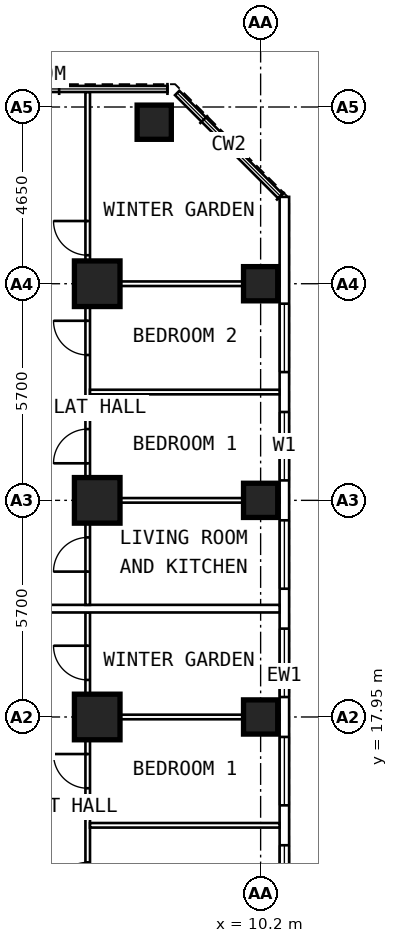
"""IFC4 building model, lengths in metres.
Left out: names, types, materials, properties, quantities, classifications, styles, units other than length and angle.
Written with IfcOpenShell. Run it as: python <this file> out.ifc"""

import sys

from ifc_helpers import new_model, si_unit, direction, frame, frame_2d, origin, origin_2d, place, context, subcontext, project, spatial, rectangle, extrude, element, fill, save


model = new_model("IFC4")
c1 = context("Model", 3, precision=1e-05, world=origin(), true_north=direction((0.0, 1.0)))
c2 = subcontext(c1, "Body", "Model", "MODEL_VIEW")
j1 = project(units=[si_unit("LENGTHUNIT", "METRE"), si_unit("PLANEANGLEUNIT", "RADIAN")], contexts=[c1])
p1 = place(None, origin())
s1 = spatial("IfcSite", under=j1, at=p1, CompositionType="ELEMENT")
p2 = place(p1, origin())
s2 = spatial("IfcBuilding", under=s1, at=p2, CompositionType="ELEMENT")
p3 = place(p2, frame((0.0, 0.0, 88.0)))
s3 = spatial("IfcBuildingStorey", under=s2, at=p3, CompositionType="ELEMENT", Elevation=88.0)
for number, where, z_axis, x_axis in (
    (1, (10.2, 17.95, 0.0), (0.0, 0.0, 1.0), (0.0, 1.0, 0.0)),
    (2, (10.2, 23.65, 0.0), (0.0, 0.0, 1.0), (0.0, 1.0, 0.0)),
    (3, (10.2, 29.35, 0.0), (0.0, 0.0, 1.0), (0.0, 1.0, 0.0)),
    (4, (7.4, 33.6, 0.0), (0.0, 0.0, 1.0), (0.0, 1.0, 0.0)),
):
    element("IfcColumn", number, at=place(p3, frame(where, z_axis=z_axis, x_axis=x_axis)), inside=s3, PredefinedType="COLUMN", context=c2, shape_type="SweptSolid", body=[
        extrude(rectangle(XDim=0.9, YDim=0.9, at=origin_2d()), origin(), (0.0, 0.0, 1.0), 3.6),
    ])
for number, where, z_axis, x_axis in (
    (5, (5.9, 17.95, 0.0), (0.0, 0.0, 1.0), (0.0, 1.0, 0.0)),
    (6, (5.9, 23.65, 0.0), (0.0, 0.0, 1.0), (0.0, 1.0, 0.0)),
    (7, (5.9, 29.35, 0.0), (0.0, 0.0, 1.0), (0.0, 1.0, 0.0)),
):
    element("IfcColumn", number, at=place(p3, frame(where, z_axis=z_axis, x_axis=x_axis)), inside=s3, PredefinedType="COLUMN", context=c2, shape_type="SweptSolid", body=[
        extrude(rectangle(XDim=1.2, YDim=1.2, at=origin_2d()), origin(), (0.0, 0.0, 1.0), 3.6),
    ])
p4 = place(p3, frame((10.825, 6.409, 0.0), z_axis=(0.0, 0.0, 1.0), x_axis=(0.0, 1.0, 0.0)))
e8 = element("IfcWall", 8, at=p4, inside=s3, PredefinedType="SOLIDWALL", context=c2, shape_type="SweptSolid", body=[
    extrude(rectangle(XDim=25.226, YDim=0.25, at=frame_2d((12.613, 0.0))), origin(), (0.0, 0.0, 1.0), 3.35),
])
p5 = place(p4, frame((0.666, 0.0, 0.8)))
e9 = element("IfcOpeningElement", 9, at=p5, cuts=e8, PredefinedType="OPENING", context=c2, shape_type="SweptSolid", body=[
    extrude(rectangle(XDim=1.8, YDim=1.8, at=frame_2d((0.9, 0.9))), frame((0.0, 0.137, 0.0), z_axis=(0.0, -1.0, 0.0), x_axis=(1.0, 0.0, 0.0)), (0.0, 0.0, 1.0), 0.274),
])
p6 = place(p4, frame((3.516, 0.0, 0.8)))
e10 = element("IfcOpeningElement", 10, at=p6, cuts=e8, PredefinedType="OPENING", context=c2, shape_type="SweptSolid", body=[
    extrude(rectangle(XDim=1.8, YDim=1.8, at=frame_2d((0.9, 0.9))), frame((0.0, 0.137, 0.0), z_axis=(0.0, -1.0, 0.0), x_axis=(1.0, 0.0, 0.0)), (0.0, 0.0, 1.0), 0.274),
])
p7 = place(p4, frame((6.366, 0.0, 0.8)))
e11 = element("IfcOpeningElement", 11, at=p7, cuts=e8, PredefinedType="OPENING", context=c2, shape_type="SweptSolid", body=[
    extrude(rectangle(XDim=1.8, YDim=1.8, at=frame_2d((0.9, 0.9))), frame((0.0, 0.137, 0.0), z_axis=(0.0, -1.0, 0.0), x_axis=(1.0, 0.0, 0.0)), (0.0, 0.0, 1.0), 0.274),
])
p8 = place(p4, frame((9.216, 0.0, 0.8)))
e12 = element("IfcOpeningElement", 12, at=p8, cuts=e8, PredefinedType="OPENING", context=c2, shape_type="SweptSolid", body=[
    extrude(rectangle(XDim=1.8, YDim=1.8, at=frame_2d((0.9, 0.9))), frame((0.0, 0.137, 0.0), z_axis=(0.0, -1.0, 0.0), x_axis=(1.0, 0.0, 0.0)), (0.0, 0.0, 1.0), 0.274),
])
p9 = place(p4, frame((12.066, 0.0, 0.8)))
e13 = element("IfcOpeningElement", 13, at=p9, cuts=e8, PredefinedType="OPENING", context=c2, shape_type="SweptSolid", body=[
    extrude(rectangle(XDim=1.8, YDim=1.8, at=frame_2d((0.9, 0.9))), frame((0.0, 0.137, 0.0), z_axis=(0.0, -1.0, 0.0), x_axis=(1.0, 0.0, 0.0)), (0.0, 0.0, 1.0), 0.274),
])
p10 = place(p4, frame((14.916, 0.0, 0.8)))
e14 = element("IfcOpeningElement", 14, at=p10, cuts=e8, PredefinedType="OPENING", context=c2, shape_type="SweptSolid", body=[
    extrude(rectangle(XDim=1.8, YDim=1.8, at=frame_2d((0.9, 0.9))), frame((0.0, 0.137, 0.0), z_axis=(0.0, -1.0, 0.0), x_axis=(1.0, 0.0, 0.0)), (0.0, 0.0, 1.0), 0.274),
])
p11 = place(p4, frame((17.766, 0.0, 0.8)))
e15 = element("IfcOpeningElement", 15, at=p11, cuts=e8, PredefinedType="OPENING", context=c2, shape_type="SweptSolid", body=[
    extrude(rectangle(XDim=1.8, YDim=1.8, at=frame_2d((0.9, 0.9))), frame((0.0, 0.137, 0.0), z_axis=(0.0, -1.0, 0.0), x_axis=(1.0, 0.0, 0.0)), (0.0, 0.0, 1.0), 0.274),
])
p12 = place(p4, frame((20.616, 0.0, 0.8)))
e16 = element("IfcOpeningElement", 16, at=p12, cuts=e8, PredefinedType="OPENING", context=c2, shape_type="SweptSolid", body=[
    extrude(rectangle(XDim=1.8, YDim=1.8, at=frame_2d((0.9, 0.9))), frame((0.0, 0.137, 0.0), z_axis=(0.0, -1.0, 0.0), x_axis=(1.0, 0.0, 0.0)), (0.0, 0.0, 1.0), 0.274),
])
p13 = place(p3, frame((5.65, 9.6, 0.0), z_axis=(0.0, 0.0, 1.0), x_axis=(0.0, 1.0, 0.0)))
e17 = element("IfcWall", 17, at=p13, inside=s3, PredefinedType="PARTITIONING", context=c2, shape_type="SweptSolid", body=[
    extrude(rectangle(XDim=11.1, YDim=0.12, at=frame_2d((5.55, 0.0))), origin(), (0.0, 0.0, 1.0), 3.35),
])
p14 = place(p13, frame((1.0, 0.0, 0.0)))
e18 = element("IfcOpeningElement", 18, at=p14, cuts=e17, PredefinedType="OPENING", context=c2, shape_type="SweptSolid", body=[
    extrude(rectangle(XDim=0.9, YDim=2.1, at=frame_2d((0.45, 1.05))), frame((0.0, 0.072, 0.0), z_axis=(0.0, -1.0, 0.0), x_axis=(1.0, 0.0, 0.0)), (0.0, 0.0, 1.0), 0.144),
])
p15 = place(p13, frame((3.625, 0.0, 0.0)))
e19 = element("IfcOpeningElement", 19, at=p15, cuts=e17, PredefinedType="OPENING", context=c2, shape_type="SweptSolid", body=[
    extrude(rectangle(XDim=0.9, YDim=2.1, at=frame_2d((0.45, 1.05))), frame((0.0, 0.072, 0.0), z_axis=(0.0, -1.0, 0.0), x_axis=(1.0, 0.0, 0.0)), (0.0, 0.0, 1.0), 0.144),
])
p16 = place(p13, frame((6.475, 0.0, 0.0)))
e20 = element("IfcOpeningElement", 20, at=p16, cuts=e17, PredefinedType="OPENING", context=c2, shape_type="SweptSolid", body=[
    extrude(rectangle(XDim=0.9, YDim=2.1, at=frame_2d((0.45, 1.05))), frame((0.0, 0.072, 0.0), z_axis=(0.0, -1.0, 0.0), x_axis=(1.0, 0.0, 0.0)), (0.0, 0.0, 1.0), 0.144),
])
p17 = place(p13, frame((9.325, 0.0, 0.0)))
e21 = element("IfcOpeningElement", 21, at=p17, cuts=e17, PredefinedType="OPENING", context=c2, shape_type="SweptSolid", body=[
    extrude(rectangle(XDim=0.9, YDim=2.1, at=frame_2d((0.45, 1.05))), frame((0.0, 0.072, 0.0), z_axis=(0.0, -1.0, 0.0), x_axis=(1.0, 0.0, 0.0)), (0.0, 0.0, 1.0), 0.144),
])
p18 = place(p3, frame((5.71, 15.1, 0.0), z_axis=(0.0, 0.0, 1.0), x_axis=(1.0, 0.0, 0.0)))
e22 = element("IfcWall", 22, at=p18, inside=s3, PredefinedType="PARTITIONING", context=c2, shape_type="SweptSolid", body=[
    extrude(rectangle(XDim=4.99, YDim=0.12, at=frame_2d((2.495, 0.0))), origin(), (0.0, 0.0, 1.0), 3.35),
])
p19 = place(p3, frame((5.71, 17.95, 0.0), z_axis=(0.0, 0.0, 1.0), x_axis=(1.0, 0.0, 0.0)))
e23 = element("IfcWall", 23, at=p19, inside=s3, PredefinedType="PARTITIONING", context=c2, shape_type="SweptSolid", body=[
    extrude(rectangle(XDim=4.99, YDim=0.12, at=frame_2d((2.495, 0.0))), origin(), (0.0, 0.0, 1.0), 2.45),
])
p20 = place(p3, frame((5.65, 20.9, 0.0), z_axis=(0.0, 0.0, 1.0), x_axis=(0.0, 1.0, 0.0)))
e24 = element("IfcWall", 24, at=p20, inside=s3, PredefinedType="PARTITIONING", context=c2, shape_type="SweptSolid", body=[
    extrude(rectangle(XDim=13.495, YDim=0.12, at=frame_2d((6.748, 0.0))), origin(), (0.0, 0.0, 1.0), 3.35),
])
p21 = place(p20, frame((0.875, 0.0, 0.0)))
e25 = element("IfcOpeningElement", 25, at=p21, cuts=e24, PredefinedType="OPENING", context=c2, shape_type="SweptSolid", body=[
    extrude(rectangle(XDim=0.9, YDim=2.1, at=frame_2d((0.45, 1.05))), frame((0.0, 0.072, 0.0), z_axis=(0.0, -1.0, 0.0), x_axis=(1.0, 0.0, 0.0)), (0.0, 0.0, 1.0), 0.144),
])
p22 = place(p20, frame((3.725, 0.0, 0.0)))
e26 = element("IfcOpeningElement", 26, at=p22, cuts=e24, PredefinedType="OPENING", context=c2, shape_type="SweptSolid", body=[
    extrude(rectangle(XDim=0.9, YDim=2.1, at=frame_2d((0.45, 1.05))), frame((0.0, 0.072, 0.0), z_axis=(0.0, -1.0, 0.0), x_axis=(1.0, 0.0, 0.0)), (0.0, 0.0, 1.0), 0.144),
])
p23 = place(p20, frame((6.575, 0.0, 0.0)))
e27 = element("IfcOpeningElement", 27, at=p23, cuts=e24, PredefinedType="OPENING", context=c2, shape_type="SweptSolid", body=[
    extrude(rectangle(XDim=0.9, YDim=2.1, at=frame_2d((0.45, 1.05))), frame((0.0, 0.072, 0.0), z_axis=(0.0, -1.0, 0.0), x_axis=(1.0, 0.0, 0.0)), (0.0, 0.0, 1.0), 0.144),
])
p24 = place(p20, frame((9.2, 0.0, 0.0)))
e28 = element("IfcOpeningElement", 28, at=p24, cuts=e24, PredefinedType="OPENING", context=c2, shape_type="SweptSolid", body=[
    extrude(rectangle(XDim=0.9, YDim=2.1, at=frame_2d((0.45, 1.05))), frame((0.0, 0.072, 0.0), z_axis=(0.0, -1.0, 0.0), x_axis=(1.0, 0.0, 0.0)), (0.0, 0.0, 1.0), 0.144),
])
p25 = place(p3, frame((5.71, 23.65, 0.0), z_axis=(0.0, 0.0, 1.0), x_axis=(1.0, 0.0, 0.0)))
e29 = element("IfcWall", 29, at=p25, inside=s3, PredefinedType="PARTITIONING", context=c2, shape_type="SweptSolid", body=[
    extrude(rectangle(XDim=4.99, YDim=0.12, at=frame_2d((2.495, 0.0))), origin(), (0.0, 0.0, 1.0), 2.45),
])
p26 = place(p3, frame((5.71, 26.5, 0.0), z_axis=(0.0, 0.0, 1.0), x_axis=(1.0, 0.0, 0.0)))
e30 = element("IfcWall", 30, at=p26, inside=s3, PredefinedType="PARTITIONING", context=c2, shape_type="SweptSolid", body=[
    extrude(rectangle(XDim=4.99, YDim=0.12, at=frame_2d((2.495, 0.0))), origin(), (0.0, 0.0, 1.0), 3.35),
])
p27 = place(p3, frame((5.71, 29.35, 0.0), z_axis=(0.0, 0.0, 1.0), x_axis=(1.0, 0.0, 0.0)))
e31 = element("IfcWall", 31, at=p27, inside=s3, PredefinedType="PARTITIONING", context=c2, shape_type="SweptSolid", body=[
    extrude(rectangle(XDim=4.99, YDim=0.12, at=frame_2d((2.495, 0.0))), origin(), (0.0, 0.0, 1.0), 2.45),
])
p28 = place(p3, frame((2.1, 20.8, 0.0), z_axis=(0.0, 0.0, 1.0), x_axis=(1.0, 0.0, 0.0)))
e32 = element("IfcWall", 32, at=p28, inside=s3, PredefinedType="PARTITIONING", context=c2, shape_type="SweptSolid", body=[
    extrude(rectangle(XDim=8.6, YDim=0.2, at=frame_2d((4.3, 0.0))), origin(), (0.0, 0.0, 1.0), 3.35),
])
p29 = place(p7, origin())
e33 = element("IfcWindow", 33, at=p29, inside=s3, PartitioningType="SINGLE_PANEL", PredefinedType="WINDOW", context=c2, shape_type="SweptSolid", body=[
    extrude(rectangle(XDim=1.8, YDim=1.8, at=frame_2d((0.9, 0.9))), frame((0.0, 0.03, 0.0), z_axis=(0.0, -1.0, 0.0), x_axis=(1.0, 0.0, 0.0)), (0.0, 0.0, 1.0), 0.06),
])
fill(e11, e33)
p30 = place(p8, origin())
e34 = element("IfcWindow", 34, at=p30, inside=s3, PartitioningType="SINGLE_PANEL", PredefinedType="WINDOW", context=c2, shape_type="SweptSolid", body=[
    extrude(rectangle(XDim=1.8, YDim=1.8, at=frame_2d((0.9, 0.9))), frame((0.0, 0.03, 0.0), z_axis=(0.0, -1.0, 0.0), x_axis=(1.0, 0.0, 0.0)), (0.0, 0.0, 1.0), 0.06),
])
fill(e12, e34)
p31 = place(p9, origin())
e35 = element("IfcWindow", 35, at=p31, inside=s3, PartitioningType="SINGLE_PANEL", PredefinedType="WINDOW", context=c2, shape_type="SweptSolid", body=[
    extrude(rectangle(XDim=1.8, YDim=1.8, at=frame_2d((0.9, 0.9))), frame((0.0, 0.03, 0.0), z_axis=(0.0, -1.0, 0.0), x_axis=(1.0, 0.0, 0.0)), (0.0, 0.0, 1.0), 0.06),
])
fill(e13, e35)
p32 = place(p10, origin())
e36 = element("IfcWindow", 36, at=p32, inside=s3, PartitioningType="SINGLE_PANEL", PredefinedType="WINDOW", context=c2, shape_type="SweptSolid", body=[
    extrude(rectangle(XDim=1.8, YDim=1.8, at=frame_2d((0.9, 0.9))), frame((0.0, 0.03, 0.0), z_axis=(0.0, -1.0, 0.0), x_axis=(1.0, 0.0, 0.0)), (0.0, 0.0, 1.0), 0.06),
])
fill(e14, e36)
p33 = place(p11, origin())
e37 = element("IfcWindow", 37, at=p33, inside=s3, PartitioningType="SINGLE_PANEL", PredefinedType="WINDOW", context=c2, shape_type="SweptSolid", body=[
    extrude(rectangle(XDim=1.8, YDim=1.8, at=frame_2d((0.9, 0.9))), frame((0.0, 0.03, 0.0), z_axis=(0.0, -1.0, 0.0), x_axis=(1.0, 0.0, 0.0)), (0.0, 0.0, 1.0), 0.06),
])
fill(e15, e37)
p34 = place(p12, origin())
e38 = element("IfcWindow", 38, at=p34, inside=s3, PartitioningType="SINGLE_PANEL", PredefinedType="WINDOW", context=c2, shape_type="SweptSolid", body=[
    extrude(rectangle(XDim=1.8, YDim=1.8, at=frame_2d((0.9, 0.9))), frame((0.0, 0.03, 0.0), z_axis=(0.0, -1.0, 0.0), x_axis=(1.0, 0.0, 0.0)), (0.0, 0.0, 1.0), 0.06),
])
fill(e16, e38)
p35 = place(p15, origin())
e39 = element("IfcDoor", 39, at=p35, inside=s3, OperationType="SINGLE_SWING_LEFT", PredefinedType="DOOR", context=c2, shape_type="SweptSolid", body=[
    extrude(rectangle(XDim=0.9, YDim=2.1, at=frame_2d((0.45, 1.05))), frame((0.0, 0.025, 0.0), z_axis=(0.0, -1.0, 0.0), x_axis=(1.0, 0.0, 0.0)), (0.0, 0.0, 1.0), 0.05),
])
fill(e19, e39)
p36 = place(p16, origin())
e40 = element("IfcDoor", 40, at=p36, inside=s3, OperationType="SINGLE_SWING_RIGHT", PredefinedType="DOOR", context=c2, shape_type="SweptSolid", body=[
    extrude(rectangle(XDim=0.9, YDim=2.1, at=frame_2d((0.45, 1.05))), frame((0.0, 0.025, 0.0), z_axis=(0.0, -1.0, 0.0), x_axis=(1.0, 0.0, 0.0)), (0.0, 0.0, 1.0), 0.05),
])
fill(e20, e40)
p37 = place(p17, origin())
e41 = element("IfcDoor", 41, at=p37, inside=s3, OperationType="SINGLE_SWING_RIGHT", PredefinedType="DOOR", context=c2, shape_type="SweptSolid", body=[
    extrude(rectangle(XDim=0.9, YDim=2.1, at=frame_2d((0.45, 1.05))), frame((0.0, 0.025, 0.0), z_axis=(0.0, -1.0, 0.0), x_axis=(1.0, 0.0, 0.0)), (0.0, 0.0, 1.0), 0.05),
])
fill(e21, e41)
p38 = place(p21, origin())
e42 = element("IfcDoor", 42, at=p38, inside=s3, OperationType="SINGLE_SWING_LEFT", PredefinedType="DOOR", context=c2, shape_type="SweptSolid", body=[
    extrude(rectangle(XDim=0.9, YDim=2.1, at=frame_2d((0.45, 1.05))), frame((0.0, 0.025, 0.0), z_axis=(0.0, -1.0, 0.0), x_axis=(1.0, 0.0, 0.0)), (0.0, 0.0, 1.0), 0.05),
])
fill(e25, e42)
p39 = place(p22, origin())
e43 = element("IfcDoor", 43, at=p39, inside=s3, OperationType="SINGLE_SWING_LEFT", PredefinedType="DOOR", context=c2, shape_type="SweptSolid", body=[
    extrude(rectangle(XDim=0.9, YDim=2.1, at=frame_2d((0.45, 1.05))), frame((0.0, 0.025, 0.0), z_axis=(0.0, -1.0, 0.0), x_axis=(1.0, 0.0, 0.0)), (0.0, 0.0, 1.0), 0.05),
])
fill(e26, e43)
p40 = place(p23, origin())
e44 = element("IfcDoor", 44, at=p40, inside=s3, OperationType="SINGLE_SWING_RIGHT", PredefinedType="DOOR", context=c2, shape_type="SweptSolid", body=[
    extrude(rectangle(XDim=0.9, YDim=2.1, at=frame_2d((0.45, 1.05))), frame((0.0, 0.025, 0.0), z_axis=(0.0, -1.0, 0.0), x_axis=(1.0, 0.0, 0.0)), (0.0, 0.0, 1.0), 0.05),
])
fill(e27, e44)
p41 = place(p24, origin())
e45 = element("IfcDoor", 45, at=p41, inside=s3, OperationType="SINGLE_SWING_RIGHT", PredefinedType="DOOR", context=c2, shape_type="SweptSolid", body=[
    extrude(rectangle(XDim=0.9, YDim=2.1, at=frame_2d((0.45, 1.05))), frame((0.0, 0.025, 0.0), z_axis=(0.0, -1.0, 0.0), x_axis=(1.0, 0.0, 0.0)), (0.0, 0.0, 1.0), 0.05),
])
fill(e28, e45)
save(model, sys.argv[1])
